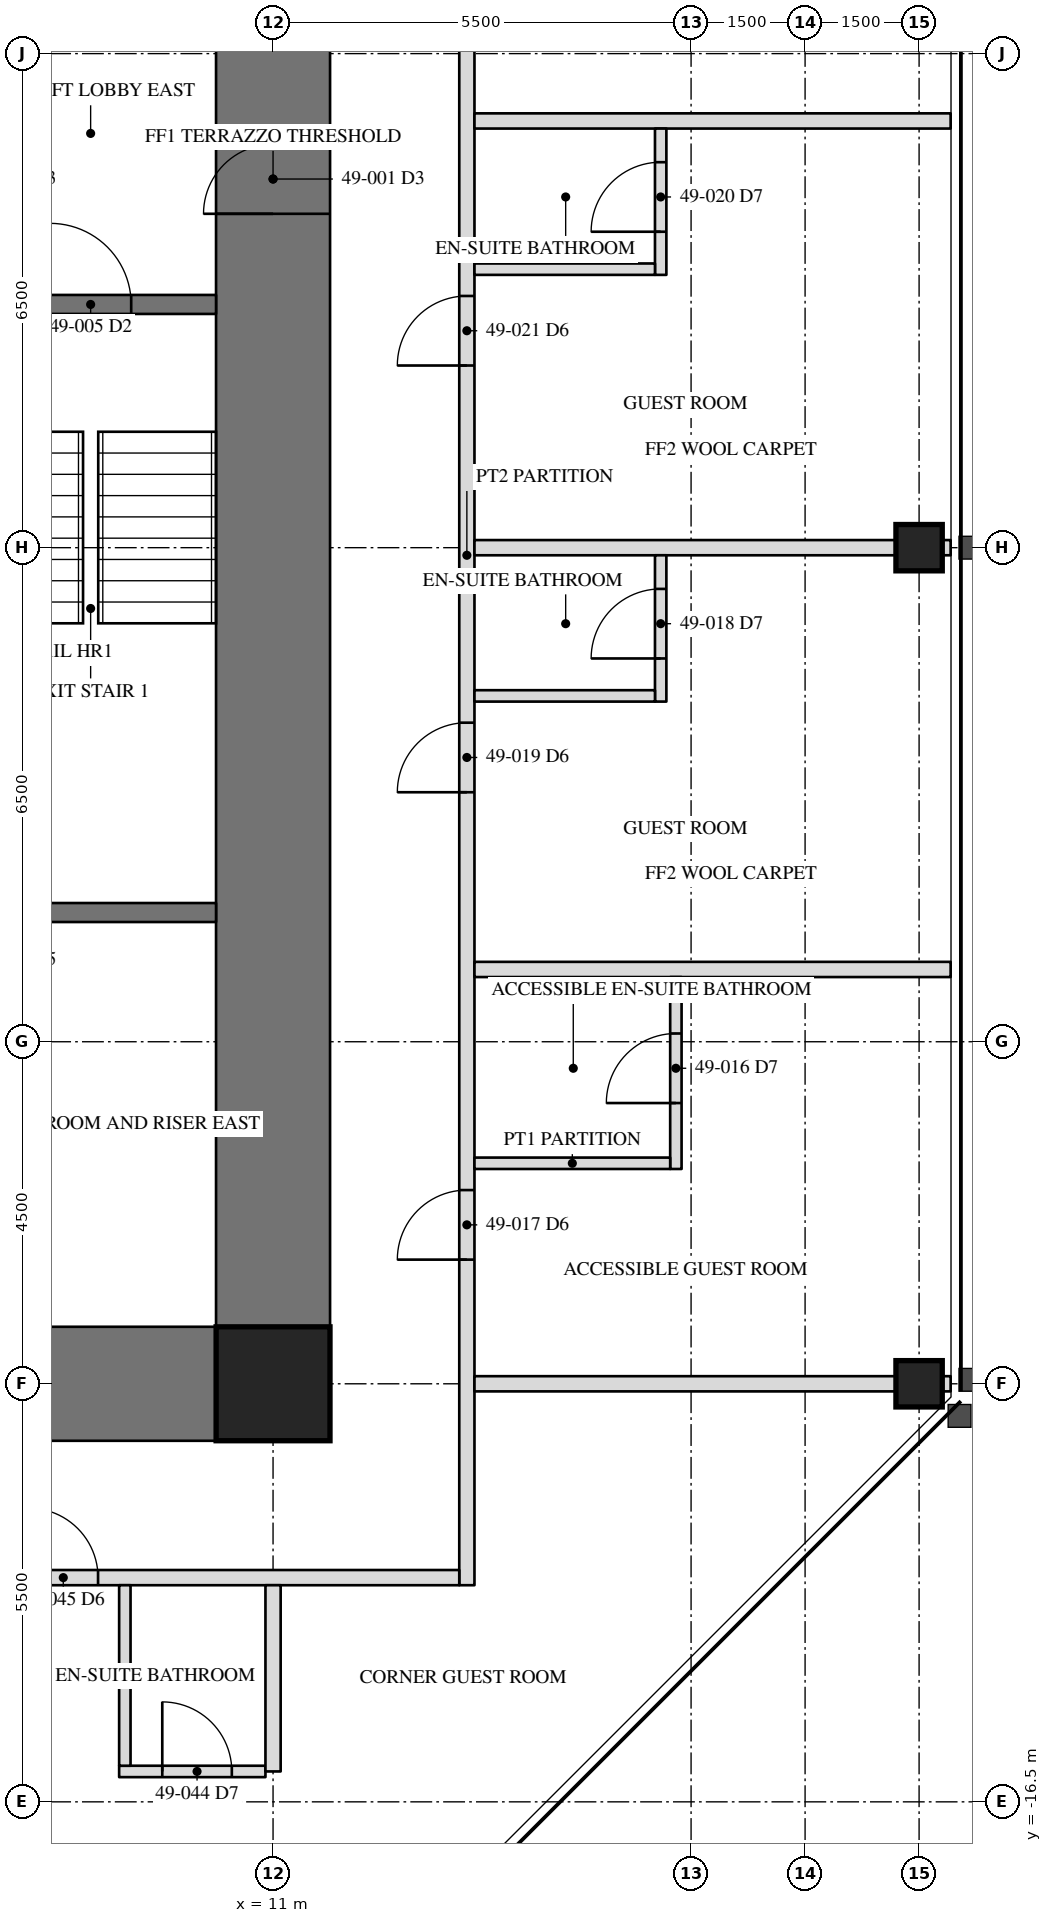
"""IFC4 building model, lengths in metres.
Left out: names, types, materials, properties, quantities, classifications, styles, units other than length and angle.
Written with IfcOpenShell. Run it as: python <this file> out.ifc"""

import sys

from ifc_helpers import new_model, si_unit, direction, frame, frame_2d, origin, origin_2d, place, context, subcontext, project, spatial, rectangle, hollow_rectangle, extrude, element, fill, save


model = new_model("IFC4")
c1 = context("Model", 3, precision=1e-05, world=origin(), true_north=direction((0.0, 1.0)))
c2 = subcontext(c1, "Body", "Model", "MODEL_VIEW")
j1 = project(units=[si_unit("LENGTHUNIT", "METRE"), si_unit("PLANEANGLEUNIT", "RADIAN")], contexts=[c1])
p1 = place(None, origin())
s1 = spatial("IfcSite", under=j1, at=p1, CompositionType="ELEMENT")
p2 = place(p1, origin())
s2 = spatial("IfcBuilding", under=s1, at=p2, CompositionType="ELEMENT")
p3 = place(p2, frame((0.0, 0.0, 208.2)))
s3 = spatial("IfcBuildingStorey", under=s2, at=p3, CompositionType="ELEMENT", Elevation=208.2)
for number, where, z_axis, x_axis in (
    (1, (19.5, -11.0, 0.0), (0.0, 0.0, 1.0), (0.0, 1.0, 0.0)),
    (2, (19.5, 0.0, 0.0), (0.0, 0.0, 1.0), (0.0, 1.0, 0.0)),
):
    element("IfcColumn", number, at=place(p3, frame(where, z_axis=z_axis, x_axis=x_axis)), inside=s3, PredefinedType="COLUMN", context=c2, shape_type="SweptSolid", body=[
        extrude(hollow_rectangle(XDim=0.61, YDim=0.61, WallThickness=0.076, at=origin_2d()), origin(), (0.0, 0.0, 1.0), 3.5),
    ])
p4 = place(p3, frame((11.0, -11.0, 0.0), z_axis=(0.0, 0.0, 1.0), x_axis=(0.0, 1.0, 0.0)))
e3 = element("IfcWall", 3, at=p4, inside=s3, PredefinedType="SHEAR", context=c2, shape_type="SweptSolid", body=[
    extrude(rectangle(XDim=22.0, YDim=1.5, at=frame_2d((11.0, 0.0))), origin(), (0.0, 0.0, 1.0), 3.5),
])
p5 = place(p4, frame((15.393, 0.0, 0.0)))
e4 = element("IfcOpeningElement", 4, at=p5, cuts=e3, PredefinedType="OPENING", context=c2, shape_type="SweptSolid", body=[
    extrude(rectangle(XDim=0.915, YDim=2.134, at=frame_2d((0.458, 1.067))), frame((0.0, 0.76, 0.0), z_axis=(0.0, -1.0, 0.0), x_axis=(1.0, 0.0, 0.0)), (0.0, 0.0, 1.0), 1.52),
])
p6 = place(p3, frame((6.5, -11.0, 0.0), z_axis=(0.0, 0.0, 1.0), x_axis=(1.0, 0.0, 0.0)))
e5 = element("IfcWall", 5, at=p6, inside=s3, PredefinedType="SHEAR", context=c2, shape_type="SweptSolid", body=[
    extrude(rectangle(XDim=4.5, YDim=1.5, at=frame_2d((2.25, 0.0))), origin(), (0.0, 0.0, 1.0), 3.5),
])
p7 = place(p3, frame((11.0, -11.0, 0.0), z_axis=(0.0, 0.0, 1.0), x_axis=(1.0, 0.0, 0.0)))
e6 = element("IfcColumn", 6, at=p7, inside=s3, PredefinedType="COLUMN", context=c2, shape_type="SweptSolid", body=[
    extrude(hollow_rectangle(XDim=1.499, YDim=1.499, WallThickness=0.102, at=origin_2d()), origin(), (0.0, 0.0, 1.0), 3.5),
])
p8 = place(p3, frame((6.95, -4.8, 0.0), z_axis=(0.0, 0.0, 1.0), x_axis=(1.0, 0.0, 0.0)))
e7 = element("IfcWall", 7, at=p8, inside=s3, PredefinedType="SOLIDWALL", context=c2, shape_type="SweptSolid", body=[
    extrude(rectangle(XDim=3.3, YDim=0.25, at=frame_2d((1.65, 0.0))), origin(), (0.0, 0.0, 1.0), 3.31),
])
p9 = place(p3, frame((6.95, 3.2, 0.0), z_axis=(0.0, 0.0, 1.0), x_axis=(1.0, 0.0, 0.0)))
e8 = element("IfcWall", 8, at=p9, inside=s3, PredefinedType="SOLIDWALL", context=c2, shape_type="SweptSolid", body=[
    extrude(rectangle(XDim=3.3, YDim=0.25, at=frame_2d((1.65, 0.0))), origin(), (0.0, 0.0, 1.0), 3.31),
])
p10 = place(p9, frame((1.116, 0.0, 0.0)))
e9 = element("IfcOpeningElement", 9, at=p10, cuts=e8, PredefinedType="OPENING", context=c2, shape_type="SweptSolid", body=[
    extrude(rectangle(XDim=1.067, YDim=2.134, at=frame_2d((0.533, 1.067))), frame((0.0, 0.135, 0.0), z_axis=(0.0, -1.0, 0.0), x_axis=(1.0, 0.0, 0.0)), (0.0, 0.0, 1.0), 0.27),
])
p11 = place(p3, frame((13.55, -13.65, 0.0), z_axis=(0.0, 0.0, 1.0), x_axis=(0.0, 1.0, 0.0)))
e10 = element("IfcWall", 10, at=p11, inside=s3, PredefinedType="PARTITIONING", context=c2, shape_type="SweptSolid", body=[
    extrude(rectangle(XDim=27.1, YDim=0.2, at=frame_2d((13.55, 0.0))), origin(), (0.0, 0.0, 1.0), 3.31),
])
p12 = place(p11, frame((4.283, 0.0, 0.0)))
e11 = element("IfcOpeningElement", 11, at=p12, cuts=e10, PredefinedType="OPENING", context=c2, shape_type="SweptSolid", body=[
    extrude(rectangle(XDim=0.915, YDim=2.134, at=frame_2d((0.458, 1.067))), frame((0.0, 0.11, 0.0), z_axis=(0.0, -1.0, 0.0), x_axis=(1.0, 0.0, 0.0)), (0.0, 0.0, 1.0), 0.22),
])
p13 = place(p11, frame((10.433, 0.0, 0.0)))
e12 = element("IfcOpeningElement", 12, at=p13, cuts=e10, PredefinedType="OPENING", context=c2, shape_type="SweptSolid", body=[
    extrude(rectangle(XDim=0.915, YDim=2.134, at=frame_2d((0.458, 1.067))), frame((0.0, 0.11, 0.0), z_axis=(0.0, -1.0, 0.0), x_axis=(1.0, 0.0, 0.0)), (0.0, 0.0, 1.0), 0.22),
])
p14 = place(p11, frame((16.046, 0.0, 0.0)))
e13 = element("IfcOpeningElement", 13, at=p14, cuts=e10, PredefinedType="OPENING", context=c2, shape_type="SweptSolid", body=[
    extrude(rectangle(XDim=0.915, YDim=2.134, at=frame_2d((0.458, 1.067))), frame((0.0, 0.11, 0.0), z_axis=(0.0, -1.0, 0.0), x_axis=(1.0, 0.0, 0.0)), (0.0, 0.0, 1.0), 0.22),
])
p15 = place(p11, frame((21.433, 0.0, 0.0)))
e14 = element("IfcOpeningElement", 14, at=p15, cuts=e10, PredefinedType="OPENING", context=c2, shape_type="SweptSolid", body=[
    extrude(rectangle(XDim=0.915, YDim=2.134, at=frame_2d((0.458, 1.067))), frame((0.0, 0.11, 0.0), z_axis=(0.0, -1.0, 0.0), x_axis=(1.0, 0.0, 0.0)), (0.0, 0.0, 1.0), 0.22),
])
p16 = place(p3, frame((-13.65, -13.55, 0.0), z_axis=(0.0, 0.0, 1.0), x_axis=(1.0, 0.0, 0.0)))
e15 = element("IfcWall", 15, at=p16, inside=s3, PredefinedType="PARTITIONING", context=c2, shape_type="SweptSolid", body=[
    extrude(rectangle(XDim=27.1, YDim=0.2, at=frame_2d((13.55, 0.0))), origin(), (0.0, 0.0, 1.0), 3.31),
])
p17 = place(p16, frame((4.884, 0.0, 0.0)))
e16 = element("IfcOpeningElement", 16, at=p17, cuts=e15, PredefinedType="OPENING", context=c2, shape_type="SweptSolid", body=[
    extrude(rectangle(XDim=0.915, YDim=2.134, at=frame_2d((0.458, 1.067))), frame((0.0, 0.11, 0.0), z_axis=(0.0, -1.0, 0.0), x_axis=(1.0, 0.0, 0.0)), (0.0, 0.0, 1.0), 0.22),
])
p18 = place(p16, frame((10.433, 0.0, 0.0)))
e17 = element("IfcOpeningElement", 17, at=p18, cuts=e15, PredefinedType="OPENING", context=c2, shape_type="SweptSolid", body=[
    extrude(rectangle(XDim=0.915, YDim=2.134, at=frame_2d((0.458, 1.067))), frame((0.0, 0.11, 0.0), z_axis=(0.0, -1.0, 0.0), x_axis=(1.0, 0.0, 0.0)), (0.0, 0.0, 1.0), 0.22),
])
p19 = place(p16, frame((16.046, 0.0, 0.0)))
e18 = element("IfcOpeningElement", 18, at=p19, cuts=e15, PredefinedType="OPENING", context=c2, shape_type="SweptSolid", body=[
    extrude(rectangle(XDim=0.915, YDim=2.134, at=frame_2d((0.458, 1.067))), frame((0.0, 0.11, 0.0), z_axis=(0.0, -1.0, 0.0), x_axis=(1.0, 0.0, 0.0)), (0.0, 0.0, 1.0), 0.22),
])
p20 = place(p16, frame((21.433, 0.0, 0.0)))
e19 = element("IfcOpeningElement", 19, at=p20, cuts=e15, PredefinedType="OPENING", context=c2, shape_type="SweptSolid", body=[
    extrude(rectangle(XDim=0.915, YDim=2.134, at=frame_2d((0.458, 1.067))), frame((0.0, 0.11, 0.0), z_axis=(0.0, -1.0, 0.0), x_axis=(1.0, 0.0, 0.0)), (0.0, 0.0, 1.0), 0.22),
])
p21 = place(p3, frame((13.65, -11.0, 0.0), z_axis=(0.0, 0.0, 1.0), x_axis=(1.0, 0.0, 0.0)))
e20 = element("IfcWall", 20, at=p21, inside=s3, PredefinedType="PARTITIONING", context=c2, shape_type="SweptSolid", body=[
    extrude(rectangle(XDim=6.265, YDim=0.2, at=frame_2d((3.133, 0.0))), origin(), (0.0, 0.0, 1.0), 2.802),
])
p22 = place(p3, frame((13.65, -5.549, 0.0), z_axis=(0.0, 0.0, 1.0), x_axis=(1.0, 0.0, 0.0)))
e21 = element("IfcWall", 21, at=p22, inside=s3, PredefinedType="PARTITIONING", context=c2, shape_type="SweptSolid", body=[
    extrude(rectangle(XDim=6.265, YDim=0.2, at=frame_2d((3.133, 0.0))), origin(), (0.0, 0.0, 1.0), 3.31),
])
p23 = place(p3, frame((13.65, 0.0, 0.0), z_axis=(0.0, 0.0, 1.0), x_axis=(1.0, 0.0, 0.0)))
e22 = element("IfcWall", 22, at=p23, inside=s3, PredefinedType="PARTITIONING", context=c2, shape_type="SweptSolid", body=[
    extrude(rectangle(XDim=6.265, YDim=0.2, at=frame_2d((3.133, 0.0))), origin(), (0.0, 0.0, 1.0), 2.802),
])
p24 = place(p3, frame((13.65, 5.614, 0.0), z_axis=(0.0, 0.0, 1.0), x_axis=(1.0, 0.0, 0.0)))
e23 = element("IfcWall", 23, at=p24, inside=s3, PredefinedType="PARTITIONING", context=c2, shape_type="SweptSolid", body=[
    extrude(rectangle(XDim=6.265, YDim=0.2, at=frame_2d((3.133, 0.0))), origin(), (0.0, 0.0, 1.0), 3.31),
])
p25 = place(p3, frame((16.3, -8.174, 0.0), z_axis=(0.0, 0.0, 1.0), x_axis=(0.0, 1.0, 0.0)))
e24 = element("IfcWall", 24, at=p25, inside=s3, PredefinedType="PARTITIONING", context=c2, shape_type="SweptSolid", body=[
    extrude(rectangle(XDim=2.525, YDim=0.15, at=frame_2d((1.263, 0.0))), origin(), (0.0, 0.0, 1.0), 3.31),
])
p26 = place(p25, frame((0.867, 0.0, 0.0)))
e25 = element("IfcOpeningElement", 25, at=p26, cuts=e24, PredefinedType="OPENING", context=c2, shape_type="SweptSolid", body=[
    extrude(rectangle(XDim=0.915, YDim=2.032, at=frame_2d((0.458, 1.016))), frame((0.0, 0.085, 0.0), z_axis=(0.0, -1.0, 0.0), x_axis=(1.0, 0.0, 0.0)), (0.0, 0.0, 1.0), 0.17),
])
p27 = place(p3, frame((13.65, -8.099, 0.0), z_axis=(0.0, 0.0, 1.0), x_axis=(1.0, 0.0, 0.0)))
e26 = element("IfcWall", 26, at=p27, inside=s3, PredefinedType="PARTITIONING", context=c2, shape_type="SweptSolid", body=[
    extrude(rectangle(XDim=2.575, YDim=0.15, at=frame_2d((1.288, 0.0))), origin(), (0.0, 0.0, 1.0), 3.31),
])
p28 = place(p3, frame((16.1, -2.025, 0.0), z_axis=(0.0, 0.0, 1.0), x_axis=(0.0, 1.0, 0.0)))
e27 = element("IfcWall", 27, at=p28, inside=s3, PredefinedType="PARTITIONING", context=c2, shape_type="SweptSolid", body=[
    extrude(rectangle(XDim=1.925, YDim=0.15, at=frame_2d((0.962, 0.0))), origin(), (0.0, 0.0, 1.0), 3.31),
])
p29 = place(p28, frame((0.567, 0.0, 0.0)))
e28 = element("IfcOpeningElement", 28, at=p29, cuts=e27, PredefinedType="OPENING", context=c2, shape_type="SweptSolid", body=[
    extrude(rectangle(XDim=0.915, YDim=2.032, at=frame_2d((0.458, 1.016))), frame((0.0, 0.085, 0.0), z_axis=(0.0, -1.0, 0.0), x_axis=(1.0, 0.0, 0.0)), (0.0, 0.0, 1.0), 0.17),
])
p30 = place(p3, frame((13.65, -1.95, 0.0), z_axis=(0.0, 0.0, 1.0), x_axis=(1.0, 0.0, 0.0)))
e29 = element("IfcWall", 29, at=p30, inside=s3, PredefinedType="PARTITIONING", context=c2, shape_type="SweptSolid", body=[
    extrude(rectangle(XDim=2.375, YDim=0.15, at=frame_2d((1.188, 0.0))), origin(), (0.0, 0.0, 1.0), 3.31),
])
p31 = place(p3, frame((16.1, 3.589, 0.0), z_axis=(0.0, 0.0, 1.0), x_axis=(0.0, 1.0, 0.0)))
e30 = element("IfcWall", 30, at=p31, inside=s3, PredefinedType="PARTITIONING", context=c2, shape_type="SweptSolid", body=[
    extrude(rectangle(XDim=1.925, YDim=0.15, at=frame_2d((0.962, 0.0))), origin(), (0.0, 0.0, 1.0), 3.31),
])
p32 = place(p31, frame((0.567, 0.0, 0.0)))
e31 = element("IfcOpeningElement", 31, at=p32, cuts=e30, PredefinedType="OPENING", context=c2, shape_type="SweptSolid", body=[
    extrude(rectangle(XDim=0.915, YDim=2.032, at=frame_2d((0.458, 1.016))), frame((0.0, 0.085, 0.0), z_axis=(0.0, -1.0, 0.0), x_axis=(1.0, 0.0, 0.0)), (0.0, 0.0, 1.0), 0.17),
])
p33 = place(p3, frame((13.65, 3.664, 0.0), z_axis=(0.0, 0.0, 1.0), x_axis=(1.0, 0.0, 0.0)))
e32 = element("IfcWall", 32, at=p33, inside=s3, PredefinedType="PARTITIONING", context=c2, shape_type="SweptSolid", body=[
    extrude(rectangle(XDim=2.375, YDim=0.15, at=frame_2d((1.188, 0.0))), origin(), (0.0, 0.0, 1.0), 2.703),
])
p34 = place(p3, frame((8.975, -16.1, 0.0), z_axis=(0.0, 0.0, 1.0), x_axis=(1.0, 0.0, 0.0)))
e33 = element("IfcWall", 33, at=p34, inside=s3, PredefinedType="PARTITIONING", context=c2, shape_type="SweptSolid", body=[
    extrude(rectangle(XDim=1.925, YDim=0.15, at=frame_2d((0.962, 0.0))), origin(), (0.0, 0.0, 1.0), 3.31),
])
p35 = place(p34, frame((0.567, 0.0, 0.0)))
e34 = element("IfcOpeningElement", 34, at=p35, cuts=e33, PredefinedType="OPENING", context=c2, shape_type="SweptSolid", body=[
    extrude(rectangle(XDim=0.915, YDim=2.032, at=frame_2d((0.458, 1.016))), frame((0.0, 0.085, 0.0), z_axis=(0.0, -1.0, 0.0), x_axis=(1.0, 0.0, 0.0)), (0.0, 0.0, 1.0), 0.17),
])
p36 = place(p3, frame((9.05, -13.65, 0.0), z_axis=(0.0, 0.0, 1.0), x_axis=(0.0, -1.0, 0.0)))
e35 = element("IfcWall", 35, at=p36, inside=s3, PredefinedType="PARTITIONING", context=c2, shape_type="SweptSolid", body=[
    extrude(rectangle(XDim=2.375, YDim=0.15, at=frame_2d((1.188, 0.0))), origin(), (0.0, 0.0, 1.0), 3.31),
])
p37 = place(p3, frame((11.0, -13.65, 0.0), z_axis=(0.0, 0.0, 1.0), x_axis=(0.0, -1.0, 0.0)))
e36 = element("IfcWall", 36, at=p37, inside=s3, PredefinedType="PARTITIONING", context=c2, shape_type="SweptSolid", body=[
    extrude(rectangle(XDim=2.45, YDim=0.2, at=frame_2d((1.225, 0.0))), origin(), (0.0, 0.0, 1.0), 2.802),
])
p38 = place(p5, origin())
e37 = element("IfcDoor", 37, at=p38, inside=s3, OperationType="SINGLE_SWING_RIGHT", PredefinedType="DOOR", context=c2, shape_type="SweptSolid", body=[
    extrude(rectangle(XDim=0.915, YDim=2.134, at=frame_2d((0.458, 1.067))), frame((0.0, -0.675, 0.0), z_axis=(0.0, -1.0, 0.0), x_axis=(1.0, 0.0, 0.0)), (0.0, 0.0, 1.0), 0.05),
])
fill(e4, e37)
p39 = place(p10, origin())
e38 = element("IfcDoor", 38, at=p39, inside=s3, OperationType="SINGLE_SWING_LEFT", PredefinedType="DOOR", context=c2, shape_type="SweptSolid", body=[
    extrude(rectangle(XDim=1.067, YDim=2.134, at=frame_2d((0.533, 1.067))), frame((0.0, 0.025, 0.0), z_axis=(0.0, -1.0, 0.0), x_axis=(1.0, 0.0, 0.0)), (0.0, 0.0, 1.0), 0.05),
])
fill(e9, e38)
p40 = place(p26, origin())
e39 = element("IfcDoor", 39, at=p40, inside=s3, OperationType="SINGLE_SWING_LEFT", PredefinedType="DOOR", context=c2, shape_type="SweptSolid", body=[
    extrude(rectangle(XDim=0.915, YDim=2.032, at=frame_2d((0.458, 1.016))), frame((0.0, 0.025, 0.0), z_axis=(0.0, -1.0, 0.0), x_axis=(1.0, 0.0, 0.0)), (0.0, 0.0, 1.0), 0.05),
])
fill(e25, e39)
p41 = place(p12, origin())
e40 = element("IfcDoor", 40, at=p41, inside=s3, OperationType="SINGLE_SWING_LEFT", PredefinedType="DOOR", context=c2, shape_type="SweptSolid", body=[
    extrude(rectangle(XDim=0.915, YDim=2.134, at=frame_2d((0.458, 1.067))), frame((0.0, 0.025, 0.0), z_axis=(0.0, -1.0, 0.0), x_axis=(1.0, 0.0, 0.0)), (0.0, 0.0, 1.0), 0.05),
])
fill(e11, e40)
p42 = place(p29, origin())
e41 = element("IfcDoor", 41, at=p42, inside=s3, OperationType="SINGLE_SWING_LEFT", PredefinedType="DOOR", context=c2, shape_type="SweptSolid", body=[
    extrude(rectangle(XDim=0.915, YDim=2.032, at=frame_2d((0.458, 1.016))), frame((0.0, 0.025, 0.0), z_axis=(0.0, -1.0, 0.0), x_axis=(1.0, 0.0, 0.0)), (0.0, 0.0, 1.0), 0.05),
])
fill(e28, e41)
p43 = place(p13, origin())
e42 = element("IfcDoor", 42, at=p43, inside=s3, OperationType="SINGLE_SWING_LEFT", PredefinedType="DOOR", context=c2, shape_type="SweptSolid", body=[
    extrude(rectangle(XDim=0.915, YDim=2.134, at=frame_2d((0.458, 1.067))), frame((0.0, 0.025, 0.0), z_axis=(0.0, -1.0, 0.0), x_axis=(1.0, 0.0, 0.0)), (0.0, 0.0, 1.0), 0.05),
])
fill(e12, e42)
p44 = place(p32, origin())
e43 = element("IfcDoor", 43, at=p44, inside=s3, OperationType="SINGLE_SWING_LEFT", PredefinedType="DOOR", context=c2, shape_type="SweptSolid", body=[
    extrude(rectangle(XDim=0.915, YDim=2.032, at=frame_2d((0.458, 1.016))), frame((0.0, 0.025, 0.0), z_axis=(0.0, -1.0, 0.0), x_axis=(1.0, 0.0, 0.0)), (0.0, 0.0, 1.0), 0.05),
])
fill(e31, e43)
p45 = place(p14, origin())
e44 = element("IfcDoor", 44, at=p45, inside=s3, OperationType="SINGLE_SWING_LEFT", PredefinedType="DOOR", context=c2, shape_type="SweptSolid", body=[
    extrude(rectangle(XDim=0.915, YDim=2.134, at=frame_2d((0.458, 1.067))), frame((0.0, 0.025, 0.0), z_axis=(0.0, -1.0, 0.0), x_axis=(1.0, 0.0, 0.0)), (0.0, 0.0, 1.0), 0.05),
])
fill(e13, e44)
p46 = place(p35, origin())
e45 = element("IfcDoor", 45, at=p46, inside=s3, OperationType="SINGLE_SWING_LEFT", PredefinedType="DOOR", context=c2, shape_type="SweptSolid", body=[
    extrude(rectangle(XDim=0.915, YDim=2.032, at=frame_2d((0.458, 1.016))), frame((0.0, 0.025, 0.0), z_axis=(0.0, -1.0, 0.0), x_axis=(1.0, 0.0, 0.0)), (0.0, 0.0, 1.0), 0.05),
])
fill(e34, e45)
p47 = place(p20, origin())
e46 = element("IfcDoor", 46, at=p47, inside=s3, OperationType="SINGLE_SWING_LEFT", PredefinedType="DOOR", context=c2, shape_type="SweptSolid", body=[
    extrude(rectangle(XDim=0.915, YDim=2.134, at=frame_2d((0.458, 1.067))), frame((0.0, 0.025, 0.0), z_axis=(0.0, -1.0, 0.0), x_axis=(1.0, 0.0, 0.0)), (0.0, 0.0, 1.0), 0.05),
])
fill(e19, e46)
save(model, sys.argv[1])
